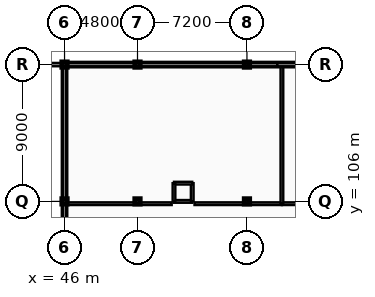
"""IFC4 building model, lengths in metres.
Left out: names, types, materials, properties, quantities, classifications, styles, units other than length and angle.
Written with IfcOpenShell. Run it as: python <this file> out.ifc"""

import sys

from ifc_helpers import new_model, si_unit, direction, frame, frame_2d, origin, origin_2d, place, context, subcontext, project, spatial, rectangle, extrude, element, fill, save


model = new_model("IFC4")
c1 = context("Model", 3, precision=1e-05, world=origin(), true_north=direction((0.0, 1.0)))
c2 = subcontext(c1, "Body", "Model", "MODEL_VIEW")
j1 = project(units=[si_unit("LENGTHUNIT", "METRE"), si_unit("PLANEANGLEUNIT", "RADIAN")], contexts=[c1])
p1 = place(None, origin())
s1 = spatial("IfcSite", under=j1, at=p1, CompositionType="ELEMENT")
p2 = place(p1, origin())
s2 = spatial("IfcBuilding", under=s1, at=p2, CompositionType="ELEMENT")
p3 = place(p2, frame((0.0, 0.0, 21.6)))
s3 = spatial("IfcBuildingStorey", under=s2, at=p3, CompositionType="ELEMENT", Elevation=21.6)
for number, where, z_axis, x_axis in (
    (1, (46.0, 106.0, 0.0), (0.0, 0.0, 1.0), (1.0, 0.0, 0.0)),
    (2, (46.0, 115.0, 0.0), (0.0, 0.0, 1.0), (1.0, 0.0, 0.0)),
    (3, (50.8, 106.0, 0.0), (0.0, 0.0, 1.0), (1.0, 0.0, 0.0)),
    (4, (50.8, 115.0, 0.0), (0.0, 0.0, 1.0), (1.0, 0.0, 0.0)),
    (5, (58.0, 106.0, 0.0), (0.0, 0.0, 1.0), (1.0, 0.0, 0.0)),
    (6, (58.0, 115.0, 0.0), (0.0, 0.0, 1.0), (1.0, 0.0, 0.0)),
):
    element("IfcColumn", number, at=place(p3, frame(where, z_axis=z_axis, x_axis=x_axis)), inside=s3, PredefinedType="COLUMN", context=c2, shape_type="SweptSolid", body=[
        extrude(rectangle(XDim=0.36, YDim=0.36, at=origin_2d()), origin(), (0.0, 0.0, 1.0), 3.6),
    ])
p4 = place(p3, frame((46.14, 105.85, 0.0), z_axis=(0.0, 0.0, 1.0), x_axis=(1.0, 0.0, 0.0)))
e7 = element("IfcWall", 7, at=p4, inside=s3, PredefinedType="PARTITIONING", context=c2, shape_type="SweptSolid", body=[
    extrude(rectangle(XDim=6.91, YDim=0.18, at=frame_2d((3.455, 0.0))), origin(), (0.0, 0.0, 1.0), 2.71),
])
p5 = place(p4, frame((2.389, 0.0, -0.01)))
e8 = element("IfcOpeningElement", 8, at=p5, cuts=e7, PredefinedType="OPENING", context=c2, shape_type="SweptSolid", body=[
    extrude(rectangle(XDim=1.6, YDim=2.21, at=frame_2d((0.8, 1.105))), frame((0.0, 0.1, 0.0), z_axis=(0.0, -1.0, 0.0), x_axis=(1.0, 0.0, 0.0)), (0.0, 0.0, 1.0), 0.2),
])
p6 = place(p3, frame((54.55, 105.85, 0.0), z_axis=(0.0, 0.0, 1.0), x_axis=(1.0, 0.0, 0.0)))
e9 = element("IfcWall", 9, at=p6, inside=s3, PredefinedType="PARTITIONING", context=c2, shape_type="SweptSolid", body=[
    extrude(rectangle(XDim=5.75, YDim=0.18, at=frame_2d((2.875, 0.0))), origin(), (0.0, 0.0, 1.0), 2.71),
])
p7 = place(p3, frame((60.3, 105.85, 0.0), z_axis=(0.0, 0.0, 1.0), x_axis=(1.0, 0.0, 0.0)))
e10 = element("IfcWall", 10, at=p7, inside=s3, PredefinedType="PARTITIONING", context=c2, shape_type="SweptSolid", body=[
    extrude(rectangle(XDim=15.1, YDim=0.18, at=frame_2d((7.55, 0.0))), origin(), (0.0, 0.0, 1.0), 2.71),
])
p8 = place(p7, frame((7.05, 0.0, -0.01)))
e11 = element("IfcOpeningElement", 11, at=p8, cuts=e10, PredefinedType="OPENING", context=c2, shape_type="SweptSolid", body=[
    extrude(rectangle(XDim=1.0, YDim=2.16, at=frame_2d((0.5, 1.08))), frame((0.0, 0.1, 0.0), z_axis=(0.0, -1.0, 0.0), x_axis=(1.0, 0.0, 0.0)), (0.0, 0.0, 1.0), 0.2),
])
p9 = place(p3, frame((60.3, 105.85, 0.0), z_axis=(0.0, 0.0, 1.0), x_axis=(0.0, 1.0, 0.0)))
e12 = element("IfcWall", 12, at=p9, inside=s3, PredefinedType="PARTITIONING", context=c2, shape_type="SweptSolid", body=[
    extrude(rectangle(XDim=9.01, YDim=0.18, at=frame_2d((4.505, 0.0))), origin(), (0.0, 0.0, 1.0), 2.71),
])
p10 = place(p3, frame((50.8, 115.0, 0.0), z_axis=(0.0, 0.0, 1.0), x_axis=(-1.0, 0.0, 0.0)))
e13 = element("IfcWall", 13, at=p10, inside=s3, PredefinedType="SOLIDWALL", context=c2, shape_type="SweptSolid", body=[
    extrude(rectangle(XDim=4.8, YDim=0.36, at=frame_2d((2.4, 0.0))), origin(), (0.0, 0.0, 1.0), 2.71),
])
p11 = place(p10, frame((0.46, 0.0, 0.75)))
e14 = element("IfcOpeningElement", 14, at=p11, cuts=e13, PredefinedType="OPENING", context=c2, shape_type="SweptSolid", body=[
    extrude(rectangle(XDim=1.55, YDim=1.82, at=frame_2d((0.775, 0.91))), frame((0.0, 0.19, 0.0), z_axis=(0.0, -1.0, 0.0), x_axis=(1.0, 0.0, 0.0)), (0.0, 0.0, 1.0), 0.38),
])
p12 = place(p10, frame((2.66, 0.0, 0.75)))
e15 = element("IfcOpeningElement", 15, at=p12, cuts=e13, PredefinedType="OPENING", context=c2, shape_type="SweptSolid", body=[
    extrude(rectangle(XDim=1.55, YDim=1.82, at=frame_2d((0.775, 0.91))), frame((0.0, 0.19, 0.0), z_axis=(0.0, -1.0, 0.0), x_axis=(1.0, 0.0, 0.0)), (0.0, 0.0, 1.0), 0.38),
])
p13 = place(p3, frame((58.0, 115.0, 0.0), z_axis=(0.0, 0.0, 1.0), x_axis=(-1.0, 0.0, 0.0)))
e16 = element("IfcWall", 16, at=p13, inside=s3, PredefinedType="SOLIDWALL", context=c2, shape_type="SweptSolid", body=[
    extrude(rectangle(XDim=7.2, YDim=0.36, at=frame_2d((3.6, 0.0))), origin(), (0.0, 0.0, 1.0), 2.71),
])
p14 = place(p13, frame((0.46, 0.0, 0.75)))
e17 = element("IfcOpeningElement", 17, at=p14, cuts=e16, PredefinedType="OPENING", context=c2, shape_type="SweptSolid", body=[
    extrude(rectangle(XDim=1.55, YDim=1.82, at=frame_2d((0.775, 0.91))), frame((0.0, 0.19, 0.0), z_axis=(0.0, -1.0, 0.0), x_axis=(1.0, 0.0, 0.0)), (0.0, 0.0, 1.0), 0.38),
])
p15 = place(p13, frame((5.06, 0.0, 0.75)))
e18 = element("IfcOpeningElement", 18, at=p15, cuts=e16, PredefinedType="OPENING", context=c2, shape_type="SweptSolid", body=[
    extrude(rectangle(XDim=1.55, YDim=1.82, at=frame_2d((0.775, 0.91))), frame((0.0, 0.19, 0.0), z_axis=(0.0, -1.0, 0.0), x_axis=(1.0, 0.0, 0.0)), (0.0, 0.0, 1.0), 0.38),
])
p16 = place(p3, frame((65.2, 115.0, 0.0), z_axis=(0.0, 0.0, 1.0), x_axis=(-1.0, 0.0, 0.0)))
e19 = element("IfcWall", 19, at=p16, inside=s3, PredefinedType="SOLIDWALL", context=c2, shape_type="SweptSolid", body=[
    extrude(rectangle(XDim=7.2, YDim=0.36, at=frame_2d((3.6, 0.0))), origin(), (0.0, 0.0, 1.0), 2.71),
])
p17 = place(p16, frame((0.46, 0.0, 0.75)))
e20 = element("IfcOpeningElement", 20, at=p17, cuts=e19, PredefinedType="OPENING", context=c2, shape_type="SweptSolid", body=[
    extrude(rectangle(XDim=1.55, YDim=1.82, at=frame_2d((0.775, 0.91))), frame((0.0, 0.19, 0.0), z_axis=(0.0, -1.0, 0.0), x_axis=(1.0, 0.0, 0.0)), (0.0, 0.0, 1.0), 0.38),
])
p18 = place(p16, frame((3.06, 0.0, 0.75)))
e21 = element("IfcOpeningElement", 21, at=p18, cuts=e19, PredefinedType="OPENING", context=c2, shape_type="SweptSolid", body=[
    extrude(rectangle(XDim=1.55, YDim=1.82, at=frame_2d((0.775, 0.91))), frame((0.0, 0.19, 0.0), z_axis=(0.0, -1.0, 0.0), x_axis=(1.0, 0.0, 0.0)), (0.0, 0.0, 1.0), 0.38),
])
p19 = place(p3, frame((46.0, 106.0, 0.0), z_axis=(0.0, 0.0, 1.0), x_axis=(0.0, -1.0, 0.0)))
e22 = element("IfcWall", 22, at=p19, inside=s3, PredefinedType="SOLIDWALL", context=c2, shape_type="SweptSolid", body=[
    extrude(rectangle(XDim=8.4, YDim=0.36, at=frame_2d((4.2, 0.0))), origin(), (0.0, 0.0, 1.0), 2.71),
])
p20 = place(p19, frame((0.46, 0.0, 0.75)))
e23 = element("IfcOpeningElement", 23, at=p20, cuts=e22, PredefinedType="OPENING", context=c2, shape_type="SweptSolid", body=[
    extrude(rectangle(XDim=1.55, YDim=1.82, at=frame_2d((0.775, 0.91))), frame((0.0, 0.19, 0.0), z_axis=(0.0, -1.0, 0.0), x_axis=(1.0, 0.0, 0.0)), (0.0, 0.0, 1.0), 0.38),
])
p21 = place(p19, frame((6.26, 0.0, 0.75)))
e24 = element("IfcOpeningElement", 24, at=p21, cuts=e22, PredefinedType="OPENING", context=c2, shape_type="SweptSolid", body=[
    extrude(rectangle(XDim=1.55, YDim=1.82, at=frame_2d((0.775, 0.91))), frame((0.0, 0.19, 0.0), z_axis=(0.0, -1.0, 0.0), x_axis=(1.0, 0.0, 0.0)), (0.0, 0.0, 1.0), 0.38),
])
p22 = place(p3, frame((46.0, 115.0, 0.0), z_axis=(0.0, 0.0, 1.0), x_axis=(0.0, -1.0, 0.0)))
e25 = element("IfcWall", 25, at=p22, inside=s3, PredefinedType="SOLIDWALL", context=c2, shape_type="SweptSolid", body=[
    extrude(rectangle(XDim=9.0, YDim=0.36, at=frame_2d((4.5, 0.0))), origin(), (0.0, 0.0, 1.0), 2.71),
])
p23 = place(p22, frame((0.46, 0.0, 0.75)))
e26 = element("IfcOpeningElement", 26, at=p23, cuts=e25, PredefinedType="OPENING", context=c2, shape_type="SweptSolid", body=[
    extrude(rectangle(XDim=1.55, YDim=1.82, at=frame_2d((0.775, 0.91))), frame((0.0, 0.19, 0.0), z_axis=(0.0, -1.0, 0.0), x_axis=(1.0, 0.0, 0.0)), (0.0, 0.0, 1.0), 0.38),
])
p24 = place(p22, frame((6.86, 0.0, 0.75)))
e27 = element("IfcOpeningElement", 27, at=p24, cuts=e25, PredefinedType="OPENING", context=c2, shape_type="SweptSolid", body=[
    extrude(rectangle(XDim=1.55, YDim=1.82, at=frame_2d((0.775, 0.91))), frame((0.0, 0.19, 0.0), z_axis=(0.0, -1.0, 0.0), x_axis=(1.0, 0.0, 0.0)), (0.0, 0.0, 1.0), 0.38),
])
p25 = place(p3, frame((37.6, 115.0, 0.0), z_axis=(0.0, 0.0, 1.0), x_axis=(1.0, 0.0, 0.0)))
e28 = element("IfcWall", 28, at=p25, inside=s3, PredefinedType="PARAPET", context=c2, shape_type="SweptSolid", body=[
    extrude(rectangle(XDim=8.4, YDim=0.22, at=frame_2d((4.2, 0.0))), origin(), (0.0, 0.0, 1.0), 1.28),
])
p26 = place(p3, frame((46.0, 115.0, 3.6), z_axis=(0.0, 0.0, 1.0), x_axis=(1.0, 0.0, 0.0)))
e29 = element("IfcWall", 29, at=p26, inside=s3, PredefinedType="PARAPET", context=c2, shape_type="SweptSolid", body=[
    extrude(rectangle(XDim=14.0, YDim=0.22, at=frame_2d((7.0, 0.0))), origin(), (0.0, 0.0, 1.0), 1.2),
])
p27 = place(p3, frame((60.0, 115.0, 3.6), z_axis=(0.0, 0.0, 1.0), x_axis=(1.0, 0.0, 0.0)))
e30 = element("IfcWall", 30, at=p27, inside=s3, PredefinedType="PARAPET", context=c2, shape_type="SweptSolid", body=[
    extrude(rectangle(XDim=14.0, YDim=0.22, at=frame_2d((7.0, 0.0))), origin(), (0.0, 0.0, 1.0), 1.65),
])
p28 = place(p3, frame((46.0, 97.6, 3.6), z_axis=(0.0, 0.0, 1.0), x_axis=(0.0, 1.0, 0.0)))
e31 = element("IfcWall", 31, at=p28, inside=s3, PredefinedType="PARAPET", context=c2, shape_type="SweptSolid", body=[
    extrude(rectangle(XDim=17.4, YDim=0.22, at=frame_2d((8.7, 0.0))), origin(), (0.0, 0.0, 1.0), 1.15),
])
p29 = place(p3, frame((53.2, 106.0, 0.0), z_axis=(0.0, 0.0, 1.0), x_axis=(1.0, 0.0, 0.0)))
e32 = element("IfcWall", 32, at=p29, inside=s3, PredefinedType="SOLIDWALL", context=c2, shape_type="SweptSolid", body=[
    extrude(rectangle(XDim=1.2, YDim=0.18, at=frame_2d((0.6, 0.0))), origin(), (0.0, 0.0, 1.0), 3.35),
])
p30 = place(p29, frame((0.2, 0.0, -0.01)))
e33 = element("IfcOpeningElement", 33, at=p30, cuts=e32, PredefinedType="OPENING", context=c2, shape_type="SweptSolid", body=[
    extrude(rectangle(XDim=0.8, YDim=2.06, at=frame_2d((0.4, 1.03))), frame((0.0, 0.1, 0.0), z_axis=(0.0, -1.0, 0.0), x_axis=(1.0, 0.0, 0.0)), (0.0, 0.0, 1.0), 0.2),
])
for number, where, z_axis, x_axis in (
    (34, (54.4, 106.0, 0.0), (0.0, 0.0, 1.0), (0.0, 1.0, 0.0)),
    (35, (54.4, 107.2, 0.0), (0.0, 0.0, 1.0), (-1.0, 0.0, 0.0)),
    (36, (53.2, 107.2, 0.0), (0.0, 0.0, 1.0), (0.0, -1.0, 0.0)),
):
    element("IfcWall", number, at=place(p3, frame(where, z_axis=z_axis, x_axis=x_axis)), inside=s3, PredefinedType="SOLIDWALL", context=c2, shape_type="SweptSolid", body=[
        extrude(rectangle(XDim=1.2, YDim=0.18, at=frame_2d((0.6, 0.0))), origin(), (0.0, 0.0, 1.0), 3.35),
    ])
p31 = place(p5, frame((0.0, 0.0, 0.01)))
e37 = element("IfcDoor", 37, at=p31, inside=s3, OperationType="DOUBLE_SWING_LEFT", PredefinedType="DOOR", context=c2, shape_type="SweptSolid", body=[
    extrude(rectangle(XDim=1.6, YDim=2.2, at=frame_2d((0.8, 1.1))), frame((0.0, 0.025, 0.0), z_axis=(0.0, -1.0, 0.0), x_axis=(1.0, 0.0, 0.0)), (0.0, 0.0, 1.0), 0.05),
])
fill(e8, e37)
p32 = place(p11, origin())
e38 = element("IfcWindow", 38, at=p32, inside=s3, PartitioningType="DOUBLE_PANEL_HORIZONTAL", PredefinedType="WINDOW", context=c2, shape_type="SweptSolid", body=[
    extrude(rectangle(XDim=1.55, YDim=1.82, at=frame_2d((0.775, 0.91))), frame((0.0, 0.03, 0.0), z_axis=(0.0, -1.0, 0.0), x_axis=(1.0, 0.0, 0.0)), (0.0, 0.0, 1.0), 0.06),
])
fill(e14, e38)
p33 = place(p12, origin())
e39 = element("IfcWindow", 39, at=p33, inside=s3, PartitioningType="DOUBLE_PANEL_HORIZONTAL", PredefinedType="WINDOW", context=c2, shape_type="SweptSolid", body=[
    extrude(rectangle(XDim=1.55, YDim=1.82, at=frame_2d((0.775, 0.91))), frame((0.0, 0.03, 0.0), z_axis=(0.0, -1.0, 0.0), x_axis=(1.0, 0.0, 0.0)), (0.0, 0.0, 1.0), 0.06),
])
fill(e15, e39)
p34 = place(p14, origin())
e40 = element("IfcWindow", 40, at=p34, inside=s3, PartitioningType="DOUBLE_PANEL_HORIZONTAL", PredefinedType="WINDOW", context=c2, shape_type="SweptSolid", body=[
    extrude(rectangle(XDim=1.55, YDim=1.82, at=frame_2d((0.775, 0.91))), frame((0.0, 0.03, 0.0), z_axis=(0.0, -1.0, 0.0), x_axis=(1.0, 0.0, 0.0)), (0.0, 0.0, 1.0), 0.06),
])
fill(e17, e40)
p35 = place(p15, origin())
e41 = element("IfcWindow", 41, at=p35, inside=s3, PartitioningType="DOUBLE_PANEL_HORIZONTAL", PredefinedType="WINDOW", context=c2, shape_type="SweptSolid", body=[
    extrude(rectangle(XDim=1.55, YDim=1.82, at=frame_2d((0.775, 0.91))), frame((0.0, 0.03, 0.0), z_axis=(0.0, -1.0, 0.0), x_axis=(1.0, 0.0, 0.0)), (0.0, 0.0, 1.0), 0.06),
])
fill(e18, e41)
p36 = place(p18, origin())
e42 = element("IfcWindow", 42, at=p36, inside=s3, PartitioningType="DOUBLE_PANEL_HORIZONTAL", PredefinedType="WINDOW", context=c2, shape_type="SweptSolid", body=[
    extrude(rectangle(XDim=1.55, YDim=1.82, at=frame_2d((0.775, 0.91))), frame((0.0, 0.03, 0.0), z_axis=(0.0, -1.0, 0.0), x_axis=(1.0, 0.0, 0.0)), (0.0, 0.0, 1.0), 0.06),
])
fill(e21, e42)
p37 = place(p20, origin())
e43 = element("IfcWindow", 43, at=p37, inside=s3, PartitioningType="DOUBLE_PANEL_HORIZONTAL", PredefinedType="WINDOW", context=c2, shape_type="SweptSolid", body=[
    extrude(rectangle(XDim=1.55, YDim=1.82, at=frame_2d((0.775, 0.91))), frame((0.0, 0.03, 0.0), z_axis=(0.0, -1.0, 0.0), x_axis=(1.0, 0.0, 0.0)), (0.0, 0.0, 1.0), 0.06),
])
fill(e23, e43)
p38 = place(p23, origin())
e44 = element("IfcWindow", 44, at=p38, inside=s3, PartitioningType="DOUBLE_PANEL_HORIZONTAL", PredefinedType="WINDOW", context=c2, shape_type="SweptSolid", body=[
    extrude(rectangle(XDim=1.55, YDim=1.82, at=frame_2d((0.775, 0.91))), frame((0.0, 0.03, 0.0), z_axis=(0.0, -1.0, 0.0), x_axis=(1.0, 0.0, 0.0)), (0.0, 0.0, 1.0), 0.06),
])
fill(e26, e44)
p39 = place(p24, origin())
e45 = element("IfcWindow", 45, at=p39, inside=s3, PartitioningType="DOUBLE_PANEL_HORIZONTAL", PredefinedType="WINDOW", context=c2, shape_type="SweptSolid", body=[
    extrude(rectangle(XDim=1.55, YDim=1.82, at=frame_2d((0.775, 0.91))), frame((0.0, 0.03, 0.0), z_axis=(0.0, -1.0, 0.0), x_axis=(1.0, 0.0, 0.0)), (0.0, 0.0, 1.0), 0.06),
])
fill(e27, e45)
p40 = place(p30, frame((0.0, 0.0, 0.01)))
e46 = element("IfcDoor", 46, at=p40, inside=s3, OperationType="SINGLE_SWING_RIGHT", PredefinedType="DOOR", context=c2, shape_type="SweptSolid", body=[
    extrude(rectangle(XDim=0.8, YDim=2.05, at=frame_2d((0.4, 1.025))), frame((0.0, 0.025, 0.0), z_axis=(0.0, -1.0, 0.0), x_axis=(1.0, 0.0, 0.0)), (0.0, 0.0, 1.0), 0.05),
])
fill(e33, e46)
save(model, sys.argv[1])
